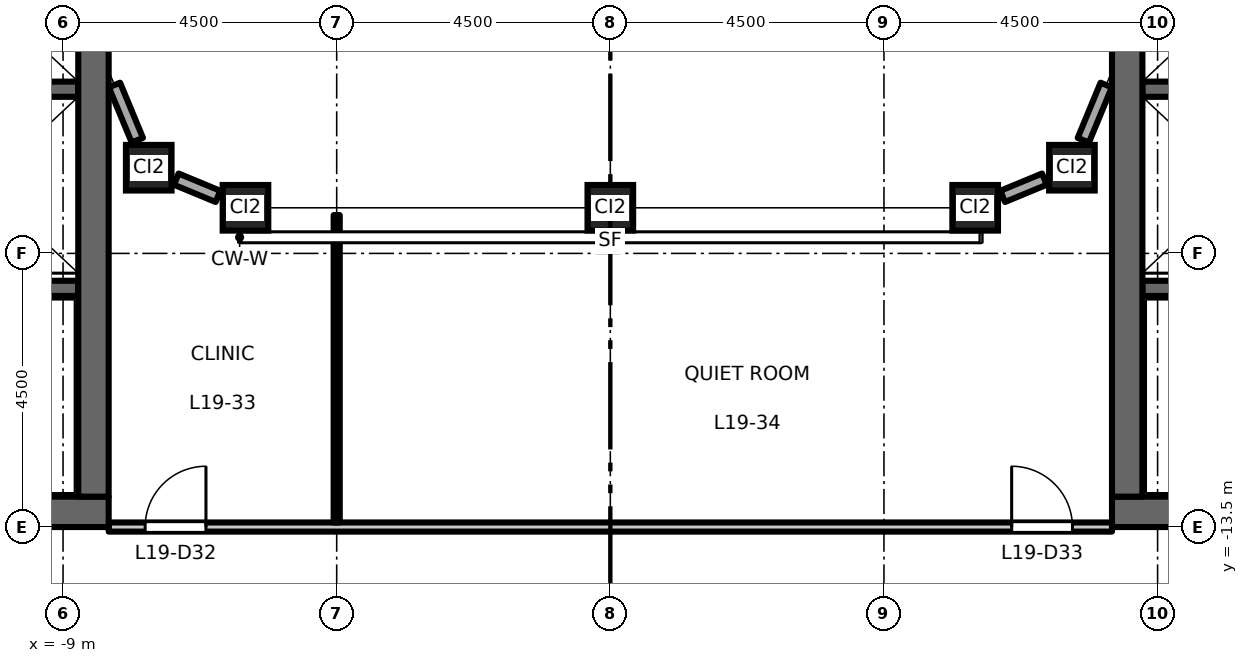
"""IFC4 building model, lengths in metres.
Left out: names, types, materials, properties, quantities, classifications, styles, units other than length and angle.
Written with IfcOpenShell. Run it as: python <this file> out.ifc"""

import sys

from ifc_helpers import new_model, si_unit, direction, frame, frame_2d, origin, origin_2d, place, context, subcontext, project, spatial, rectangle, hollow_rectangle, extrude, element, fill, save


model = new_model("IFC4")
c1 = context("Model", 3, precision=1e-05, world=origin(), true_north=direction((0.0, 1.0)))
c2 = subcontext(c1, "Body", "Model", "MODEL_VIEW")
j1 = project(units=[si_unit("LENGTHUNIT", "METRE"), si_unit("PLANEANGLEUNIT", "RADIAN")], contexts=[c1])
p1 = place(None, origin())
s1 = spatial("IfcSite", under=j1, at=p1, CompositionType="ELEMENT")
p2 = place(p1, origin())
s2 = spatial("IfcBuilding", under=s1, at=p2, CompositionType="ELEMENT")
p3 = place(p2, frame((0.0, 0.0, 89.7)))
s3 = spatial("IfcBuildingStorey", under=s2, at=p3, CompositionType="ELEMENT", Elevation=89.7)
for number, where, z_axis, x_axis in (
    (1, (-7.591, -7.591, 0.0), (0.0, 0.0, 1.0), (1.0, 0.0, 0.0)),
    (2, (-6.0, -8.25, 0.0), (0.0, 0.0, 1.0), (1.0, 0.0, 0.0)),
    (3, (0.0, -8.25, 0.0), (0.0, 0.0, 1.0), (1.0, 0.0, 0.0)),
    (4, (6.0, -8.25, 0.0), (0.0, 0.0, 1.0), (1.0, 0.0, 0.0)),
    (5, (7.591, -7.591, 0.0), (0.0, 0.0, 1.0), (1.0, 0.0, 0.0)),
):
    element("IfcColumn", number, at=place(p3, frame(where, z_axis=z_axis, x_axis=x_axis)), inside=s3, PredefinedType="COLUMN", context=c2, shape_type="SweptSolid", body=[
        extrude(hollow_rectangle(XDim=0.75, YDim=0.75, WallThickness=0.045, at=origin_2d()), origin(), (0.0, 0.0, 1.0), 4.5),
    ])
p4 = place(p3, frame((-8.75, -6.3, 0.0), z_axis=(0.0, 0.0, 1.0), x_axis=(-1.0, 0.0, 0.0)))
e6 = element("IfcWall", 6, at=p4, inside=s3, PredefinedType="SHEAR", context=c2, shape_type="SweptSolid", body=[
    extrude(rectangle(XDim=3.1, YDim=0.25, at=frame_2d((1.55, 0.0))), origin(), (0.0, 0.0, 1.0), 4.3),
])
p5 = place(p3, frame((-8.75, -9.575, 0.0), z_axis=(0.0, 0.0, 1.0), x_axis=(-1.0, 0.0, 0.0)))
e7 = element("IfcWall", 7, at=p5, inside=s3, PredefinedType="SHEAR", context=c2, shape_type="SweptSolid", body=[
    extrude(rectangle(XDim=8.0, YDim=0.25, at=frame_2d((4.0, 0.0))), origin(), (0.0, 0.0, 1.0), 4.3),
])
p6 = place(p5, frame((6.65, 0.0, 0.0)))
e8 = element("IfcOpeningElement", 8, at=p6, cuts=e7, PredefinedType="OPENING", context=c2, shape_type="SweptSolid", body=[
    extrude(rectangle(XDim=1.1, YDim=2.1, at=frame_2d((0.55, 1.05))), frame((0.0, 0.135, 0.0), z_axis=(0.0, -1.0, 0.0), x_axis=(1.0, 0.0, 0.0)), (0.0, 0.0, 1.0), 0.27),
])
p7 = place(p3, frame((-8.25, -13.25, 0.0), z_axis=(0.0, 0.0, 1.0), x_axis=(-1.0, 0.0, 0.0)))
e9 = element("IfcWall", 9, at=p7, inside=s3, PredefinedType="SHEAR", context=c2, shape_type="SweptSolid", body=[
    extrude(rectangle(XDim=13.5, YDim=0.5, at=frame_2d((6.75, 0.0))), origin(), (0.0, 0.0, 1.0), 4.3),
])
p8 = place(p3, frame((-8.5, -13.0, 0.0), z_axis=(0.0, 0.0, 1.0), x_axis=(0.0, 1.0, 0.0)))
e10 = element("IfcWall", 10, at=p8, inside=s3, PredefinedType="SHEAR", context=c2, shape_type="SweptSolid", body=[
    extrude(rectangle(XDim=26.0, YDim=0.5, at=frame_2d((13.0, 0.0))), origin(), (0.0, 0.0, 1.0), 4.3),
])
p9 = place(p3, frame((8.75, -6.3, 0.0), z_axis=(0.0, 0.0, 1.0), x_axis=(1.0, 0.0, 0.0)))
e11 = element("IfcWall", 11, at=p9, inside=s3, PredefinedType="SHEAR", context=c2, shape_type="SweptSolid", body=[
    extrude(rectangle(XDim=3.1, YDim=0.25, at=frame_2d((1.55, 0.0))), origin(), (0.0, 0.0, 1.0), 4.3),
])
p10 = place(p3, frame((8.75, -9.575, 0.0), z_axis=(0.0, 0.0, 1.0), x_axis=(1.0, 0.0, 0.0)))
e12 = element("IfcWall", 12, at=p10, inside=s3, PredefinedType="SHEAR", context=c2, shape_type="SweptSolid", body=[
    extrude(rectangle(XDim=8.0, YDim=0.25, at=frame_2d((4.0, 0.0))), origin(), (0.0, 0.0, 1.0), 4.3),
])
p11 = place(p10, frame((6.65, 0.0, 0.0)))
e13 = element("IfcOpeningElement", 13, at=p11, cuts=e12, PredefinedType="OPENING", context=c2, shape_type="SweptSolid", body=[
    extrude(rectangle(XDim=1.1, YDim=2.1, at=frame_2d((0.55, 1.05))), frame((0.0, 0.135, 0.0), z_axis=(0.0, -1.0, 0.0), x_axis=(1.0, 0.0, 0.0)), (0.0, 0.0, 1.0), 0.27),
])
p12 = place(p3, frame((8.25, -13.25, 0.0), z_axis=(0.0, 0.0, 1.0), x_axis=(1.0, 0.0, 0.0)))
e14 = element("IfcWall", 14, at=p12, inside=s3, PredefinedType="SHEAR", context=c2, shape_type="SweptSolid", body=[
    extrude(rectangle(XDim=13.5, YDim=0.5, at=frame_2d((6.75, 0.0))), origin(), (0.0, 0.0, 1.0), 4.3),
])
p13 = place(p3, frame((8.5, -13.0, 0.0), z_axis=(0.0, 0.0, 1.0), x_axis=(0.0, 1.0, 0.0)))
e15 = element("IfcWall", 15, at=p13, inside=s3, PredefinedType="SHEAR", context=c2, shape_type="SweptSolid", body=[
    extrude(rectangle(XDim=26.0, YDim=0.5, at=frame_2d((13.0, 0.0))), origin(), (0.0, 0.0, 1.0), 4.3),
])
p14 = place(p3, frame((6.453, -8.062, 0.0), z_axis=(0.0, 0.0, 1.0), x_axis=(0.923940677943, 0.382535780864, 0.0)))
e16 = element("IfcWall", 16, at=p14, inside=s3, PredefinedType="STANDARD", context=c2, shape_type="SweptSolid", body=[
    extrude(rectangle(XDim=0.742, YDim=0.2, at=frame_2d((0.371, 0.0))), origin(), (0.0, 0.0, 1.0), 3.68),
])
for number, where, z_axis, x_axis in (
    (17, (7.779, -7.138, 0.0), (0.0, 0.0, 1.0), (0.383, 0.924, 0.0)),
    (18, (-8.154, -6.231, 0.0), (0.0, 0.0, 1.0), (0.383, -0.924, 0.0)),
):
    element("IfcWall", number, at=place(p3, frame(where, z_axis=z_axis, x_axis=x_axis)), inside=s3, PredefinedType="STANDARD", context=c2, shape_type="SweptSolid", body=[
        extrude(rectangle(XDim=0.982, YDim=0.2, at=frame_2d((0.491, 0.0))), origin(), (0.0, 0.0, 1.0), 3.68),
    ])
p15 = place(p3, frame((-7.138, -7.779, 0.0), z_axis=(0.0, 0.0, 1.0), x_axis=(0.923940677943, -0.382535780864, 0.0)))
e19 = element("IfcWall", 19, at=p15, inside=s3, PredefinedType="STANDARD", context=c2, shape_type="SweptSolid", body=[
    extrude(rectangle(XDim=0.742, YDim=0.2, at=frame_2d((0.371, 0.0))), origin(), (0.0, 0.0, 1.0), 3.68),
])
p16 = place(p3, frame((-8.25, -13.5, 0.0), z_axis=(0.0, 0.0, 1.0), x_axis=(1.0, 0.0, 0.0)))
e20 = element("IfcWall", 20, at=p16, inside=s3, PredefinedType="PARTITIONING", context=c2, shape_type="SweptSolid", body=[
    extrude(rectangle(XDim=16.5, YDim=0.15, at=frame_2d((8.25, 0.0))), origin(), (0.0, 0.0, 1.0), 3.8),
])
p17 = place(p16, frame((0.6, 0.0, 0.0)))
e21 = element("IfcOpeningElement", 21, at=p17, cuts=e20, PredefinedType="OPENING", context=c2, shape_type="SweptSolid", body=[
    extrude(rectangle(XDim=1.0, YDim=2.1, at=frame_2d((0.5, 1.05))), frame((0.0, 0.085, 0.0), z_axis=(0.0, -1.0, 0.0), x_axis=(1.0, 0.0, 0.0)), (0.0, 0.0, 1.0), 0.17),
])
p18 = place(p16, frame((14.85, 0.0, 0.0)))
e22 = element("IfcOpeningElement", 22, at=p18, cuts=e20, PredefinedType="OPENING", context=c2, shape_type="SweptSolid", body=[
    extrude(rectangle(XDim=1.0, YDim=2.1, at=frame_2d((0.5, 1.05))), frame((0.0, 0.085, 0.0), z_axis=(0.0, -1.0, 0.0), x_axis=(1.0, 0.0, 0.0)), (0.0, 0.0, 1.0), 0.17),
])
p19 = place(p3, frame((-4.5, -13.425, 0.0), z_axis=(0.0, 0.0, 1.0), x_axis=(0.0, 1.0, 0.0)))
e23 = element("IfcWall", 23, at=p19, inside=s3, PredefinedType="PARTITIONING", context=c2, shape_type="SweptSolid", body=[
    extrude(rectangle(XDim=5.055, YDim=0.1, at=frame_2d((2.527, 0.0))), origin(), (0.0, 0.0, 1.0), 3.3),
])
p20 = place(p17, origin())
e24 = element("IfcDoor", 24, at=p20, inside=s3, OperationType="SINGLE_SWING_RIGHT", PredefinedType="DOOR", context=c2, shape_type="SweptSolid", body=[
    extrude(rectangle(XDim=1.0, YDim=2.1, at=frame_2d((0.5, 1.05))), frame((0.0, 0.025, 0.0), z_axis=(0.0, -1.0, 0.0), x_axis=(1.0, 0.0, 0.0)), (0.0, 0.0, 1.0), 0.05),
])
fill(e21, e24)
p21 = place(p18, origin())
e25 = element("IfcDoor", 25, at=p21, inside=s3, OperationType="SINGLE_SWING_LEFT", PredefinedType="DOOR", context=c2, shape_type="SweptSolid", body=[
    extrude(rectangle(XDim=1.0, YDim=2.1, at=frame_2d((0.5, 1.05))), frame((0.0, 0.025, 0.0), z_axis=(0.0, -1.0, 0.0), x_axis=(1.0, 0.0, 0.0)), (0.0, 0.0, 1.0), 0.05),
])
fill(e22, e25)
save(model, sys.argv[1])
